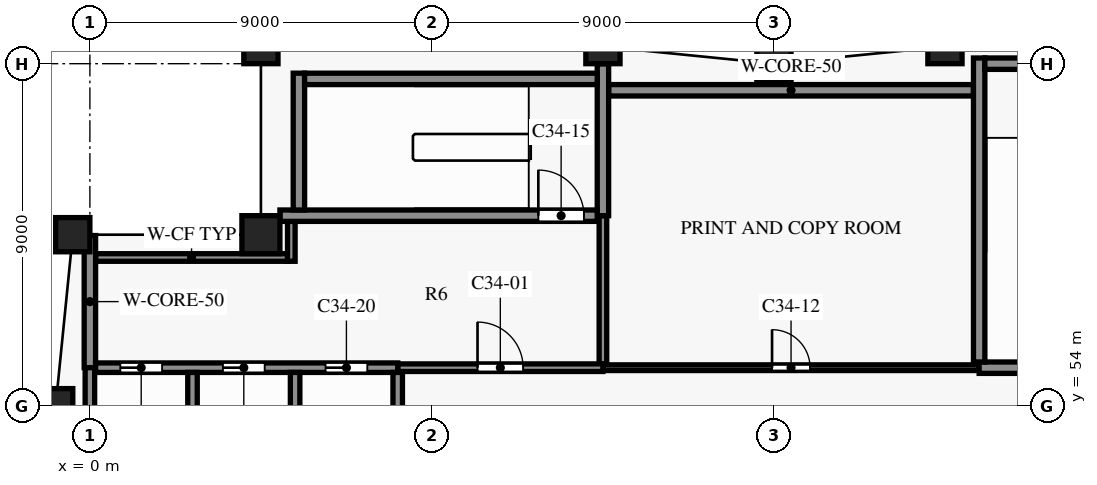
"""IFC4 building model, lengths in metres.
Left out: names, types, materials, properties, quantities, classifications, styles, units other than length and angle.
Written with IfcOpenShell. Run it as: python <this file> out.ifc"""

import sys

from ifc_helpers import new_model, si_unit, direction, frame, frame_2d, origin, origin_2d, place, context, subcontext, project, spatial, rectangle, extrude, element, fill, save


model = new_model("IFC4")
c1 = context("Model", 3, precision=1e-05, world=origin(), true_north=direction((0.0, 1.0)))
c2 = subcontext(c1, "Body", "Model", "MODEL_VIEW")
j1 = project(units=[si_unit("LENGTHUNIT", "METRE"), si_unit("PLANEANGLEUNIT", "RADIAN")], contexts=[c1])
p1 = place(None, origin())
s1 = spatial("IfcSite", under=j1, at=p1, CompositionType="ELEMENT")
p2 = place(p1, origin())
s2 = spatial("IfcBuilding", under=s1, at=p2, CompositionType="ELEMENT")
p3 = place(p2, frame((0.0, 0.0, 252.4)))
s3 = spatial("IfcBuildingStorey", under=s2, at=p3, CompositionType="ELEMENT", Elevation=252.4)
for number, where, z_axis, x_axis in (
    (1, (22.5, 63.45, 0.0), (0.0, 0.0, 1.0), (-0.995, -0.1, 0.0)),
    (2, (18.0, 63.0, 0.0), (0.0, 0.0, 1.0), (-1.0, 0.0, 0.0)),
    (3, (13.5, 63.45, 0.0), (0.0, 0.0, 1.0), (-0.995, 0.1, 0.0)),
    (4, (4.5, 63.45, 0.0), (0.0, 0.0, 1.0), (-0.995, -0.1, 0.0)),
    (5, (-0.45, 58.5, 0.0), (0.0, 0.0, 1.0), (-0.1, -0.995, 0.0)),
    (6, (-0.9, 54.0, 0.0), (0.0, 0.0, 1.0), (0.0, -1.0, 0.0)),
):
    element("IfcColumn", number, at=place(p3, frame(where, z_axis=z_axis, x_axis=x_axis)), inside=s3, PredefinedType="COLUMN", context=c2, shape_type="SweptSolid", body=[
        extrude(rectangle(XDim=0.9, YDim=0.9, at=origin_2d()), origin(), (0.0, 0.0, 1.0), 3.8),
    ])
p4 = place(p3, frame((4.5, 58.5, 0.0), z_axis=(0.0, 0.0, 1.0), x_axis=(1.0, 0.0, 0.0)))
e7 = element("IfcColumn", 7, at=p4, inside=s3, PredefinedType="COLUMN", context=c2, shape_type="SweptSolid", body=[
    extrude(rectangle(XDim=1.0, YDim=1.0, at=origin_2d()), origin(), (0.0, 0.0, 1.0), 3.8),
])
p5 = place(p3, frame((8.1, 55.0, 0.0), z_axis=(0.0, 0.0, 1.0), x_axis=(1.0, 0.0, 0.0)))
e8 = element("IfcWall", 8, at=p5, inside=s3, PredefinedType="PARTITIONING", context=c2, shape_type="SweptSolid", body=[
    extrude(rectangle(XDim=5.4, YDim=0.2, at=frame_2d((2.7, 0.0))), origin(), (0.0, 0.0, 1.0), 3.5),
])
p6 = place(p5, frame((2.1, 0.0, 0.0)))
e9 = element("IfcOpeningElement", 9, at=p6, cuts=e8, PredefinedType="OPENING", context=c2, shape_type="SweptSolid", body=[
    extrude(rectangle(XDim=1.2, YDim=2.2, at=frame_2d((0.6, 1.1))), frame((0.0, 0.11, 0.0), z_axis=(0.0, -1.0, 0.0), x_axis=(1.0, 0.0, 0.0)), (0.0, 0.0, 1.0), 0.22),
])
p7 = place(p3, frame((13.5, 55.0, 0.0), z_axis=(0.0, 0.0, 1.0), x_axis=(1.0, 0.0, 0.0)))
e10 = element("IfcWall", 10, at=p7, inside=s3, PredefinedType="PARTITIONING", context=c2, shape_type="SweptSolid", body=[
    extrude(rectangle(XDim=9.9, YDim=0.15, at=frame_2d((4.95, 0.0))), origin(), (0.0, 0.0, 1.0), 3.5),
])
p8 = place(p7, frame((4.45, 0.0, 0.0)))
e11 = element("IfcOpeningElement", 11, at=p8, cuts=e10, PredefinedType="OPENING", context=c2, shape_type="SweptSolid", body=[
    extrude(rectangle(XDim=1.0, YDim=2.1, at=frame_2d((0.5, 1.05))), frame((0.0, 0.085, 0.0), z_axis=(0.0, -1.0, 0.0), x_axis=(1.0, 0.0, 0.0)), (0.0, 0.0, 1.0), 0.17),
])
p9 = place(p3, frame((0.15, 55.0, 0.0), z_axis=(0.0, 0.0, 1.0), x_axis=(1.0, 0.0, 0.0)))
e12 = element("IfcWall", 12, at=p9, inside=s3, PredefinedType="SHEAR", context=c2, shape_type="SweptSolid", body=[
    extrude(rectangle(XDim=7.95, YDim=0.25, at=frame_2d((3.975, 0.0))), origin(), (0.0, 0.0, 1.0), 3.5),
])
p10 = place(p9, frame((0.65, 0.0, 0.0)))
e13 = element("IfcOpeningElement", 13, at=p10, cuts=e12, PredefinedType="OPENING", context=c2, shape_type="SweptSolid", body=[
    extrude(rectangle(XDim=1.1, YDim=2.1, at=frame_2d((0.55, 1.05))), frame((0.0, 0.135, 0.0), z_axis=(0.0, -1.0, 0.0), x_axis=(1.0, 0.0, 0.0)), (0.0, 0.0, 1.0), 0.27),
])
p11 = place(p9, frame((3.35, 0.0, 0.0)))
e14 = element("IfcOpeningElement", 14, at=p11, cuts=e12, PredefinedType="OPENING", context=c2, shape_type="SweptSolid", body=[
    extrude(rectangle(XDim=1.1, YDim=2.1, at=frame_2d((0.55, 1.05))), frame((0.0, 0.135, 0.0), z_axis=(0.0, -1.0, 0.0), x_axis=(1.0, 0.0, 0.0)), (0.0, 0.0, 1.0), 0.27),
])
p12 = place(p9, frame((6.05, 0.0, 0.0)))
e15 = element("IfcOpeningElement", 15, at=p12, cuts=e12, PredefinedType="OPENING", context=c2, shape_type="SweptSolid", body=[
    extrude(rectangle(XDim=1.1, YDim=2.1, at=frame_2d((0.55, 1.05))), frame((0.0, 0.135, 0.0), z_axis=(0.0, -1.0, 0.0), x_axis=(1.0, 0.0, 0.0)), (0.0, 0.0, 1.0), 0.27),
])
p13 = place(p3, frame((23.4, 55.0, 0.0), z_axis=(0.0, 0.0, 1.0), x_axis=(1.0, 0.0, 0.0)))
e16 = element("IfcWall", 16, at=p13, inside=s3, PredefinedType="SHEAR", context=c2, shape_type="SweptSolid", body=[
    extrude(rectangle(XDim=3.45, YDim=0.3, at=frame_2d((1.725, 0.0))), origin(), (0.0, 0.0, 1.0), 3.5),
])
p14 = place(p3, frame((0.15, 57.9, 0.0), z_axis=(0.0, 0.0, 1.0), x_axis=(1.0, 0.0, 0.0)))
e17 = element("IfcWall", 17, at=p14, inside=s3, PredefinedType="PARTITIONING", context=c2, shape_type="SweptSolid", body=[
    extrude(rectangle(XDim=5.05, YDim=0.2, at=frame_2d((2.525, 0.0))), origin(), (0.0, 0.0, 1.0), 3.5),
])
p15 = place(p3, frame((5.0, 59.0, 0.0), z_axis=(0.0, 0.0, 1.0), x_axis=(1.0, 0.0, 0.0)))
e18 = element("IfcWall", 18, at=p15, inside=s3, PredefinedType="SHEAR", context=c2, shape_type="SweptSolid", body=[
    extrude(rectangle(XDim=8.35, YDim=0.3, at=frame_2d((4.175, 0.0))), origin(), (0.0, 0.0, 1.0), 3.5),
])
p16 = place(p15, frame((6.8, 0.0, 0.0)))
e19 = element("IfcOpeningElement", 19, at=p16, cuts=e18, PredefinedType="OPENING", context=c2, shape_type="SweptSolid", body=[
    extrude(rectangle(XDim=1.2, YDim=2.2, at=frame_2d((0.6, 1.1))), frame((0.0, 0.16, 0.0), z_axis=(0.0, -1.0, 0.0), x_axis=(1.0, 0.0, 0.0)), (0.0, 0.0, 1.0), 0.32),
])
p17 = place(p3, frame((13.65, 62.3, 0.0), z_axis=(0.0, 0.0, 1.0), x_axis=(1.0, 0.0, 0.0)))
e20 = element("IfcWall", 20, at=p17, inside=s3, PredefinedType="SHEAR", context=c2, shape_type="SweptSolid", body=[
    extrude(rectangle(XDim=9.6, YDim=0.3, at=frame_2d((4.8, 0.0))), origin(), (0.0, 0.0, 1.0), 3.5),
])
p18 = place(p3, frame((5.65, 62.6, 0.0), z_axis=(0.0, 0.0, 1.0), x_axis=(1.0, 0.0, 0.0)))
e21 = element("IfcWall", 21, at=p18, inside=s3, PredefinedType="SHEAR", context=c2, shape_type="SweptSolid", body=[
    extrude(rectangle(XDim=7.7, YDim=0.3, at=frame_2d((3.85, 0.0))), origin(), (0.0, 0.0, 1.0), 3.5),
])
p19 = place(p3, frame((23.55, 63.0, 0.0), z_axis=(0.0, 0.0, 1.0), x_axis=(1.0, 0.0, 0.0)))
e22 = element("IfcWall", 22, at=p19, inside=s3, PredefinedType="SHEAR", context=c2, shape_type="SweptSolid", body=[
    extrude(rectangle(XDim=3.3, YDim=0.3, at=frame_2d((1.65, 0.0))), origin(), (0.0, 0.0, 1.0), 3.5),
])
p20 = place(p3, frame((0.0, 55.0, 0.0), z_axis=(0.0, 0.0, 1.0), x_axis=(0.0, 1.0, 0.0)))
e23 = element("IfcWall", 23, at=p20, inside=s3, PredefinedType="SHEAR", context=c2, shape_type="SweptSolid", body=[
    extrude(rectangle(XDim=3.478, YDim=0.3, at=frame_2d((1.739, 0.0))), origin(), (0.0, 0.0, 1.0), 3.5),
])
p21 = place(p3, frame((0.0, 51.65, 0.0), z_axis=(0.0, 0.0, 1.0), x_axis=(0.0, 1.0, 0.0)))
e24 = element("IfcWall", 24, at=p21, inside=s3, PredefinedType="SHEAR", context=c2, shape_type="SweptSolid", body=[
    extrude(rectangle(XDim=3.35, YDim=0.25, at=frame_2d((1.675, 0.0))), origin(), (0.0, 0.0, 1.0), 3.5),
])
p22 = place(p3, frame((2.7, 51.925, 0.0), z_axis=(0.0, 0.0, 1.0), x_axis=(0.0, 1.0, 0.0)))
e25 = element("IfcWall", 25, at=p22, inside=s3, PredefinedType="SHEAR", context=c2, shape_type="SweptSolid", body=[
    extrude(rectangle(XDim=2.95, YDim=0.25, at=frame_2d((1.475, 0.0))), origin(), (0.0, 0.0, 1.0), 3.5),
])
p23 = place(p3, frame((5.3, 57.8, 0.0), z_axis=(0.0, 0.0, 1.0), x_axis=(0.0, 1.0, 0.0)))
e26 = element("IfcWall", 26, at=p23, inside=s3, PredefinedType="PARTITIONING", context=c2, shape_type="SweptSolid", body=[
    extrude(rectangle(XDim=1.05, YDim=0.2, at=frame_2d((0.525, 0.0))), origin(), (0.0, 0.0, 1.0), 3.5),
])
p24 = place(p3, frame((5.4, 51.925, 0.0), z_axis=(0.0, 0.0, 1.0), x_axis=(0.0, 1.0, 0.0)))
e27 = element("IfcWall", 27, at=p24, inside=s3, PredefinedType="SHEAR", context=c2, shape_type="SweptSolid", body=[
    extrude(rectangle(XDim=2.95, YDim=0.25, at=frame_2d((1.475, 0.0))), origin(), (0.0, 0.0, 1.0), 3.5),
])
p25 = place(p3, frame((5.5, 59.15, 0.0), z_axis=(0.0, 0.0, 1.0), x_axis=(0.0, 1.0, 0.0)))
e28 = element("IfcWall", 28, at=p25, inside=s3, PredefinedType="SHEAR", context=c2, shape_type="SweptSolid", body=[
    extrude(rectangle(XDim=3.6, YDim=0.3, at=frame_2d((1.8, 0.0))), origin(), (0.0, 0.0, 1.0), 3.5),
])
p26 = place(p3, frame((8.1, 51.925, 0.0), z_axis=(0.0, 0.0, 1.0), x_axis=(0.0, 1.0, 0.0)))
e29 = element("IfcWall", 29, at=p26, inside=s3, PredefinedType="SHEAR", context=c2, shape_type="SweptSolid", body=[
    extrude(rectangle(XDim=2.95, YDim=0.25, at=frame_2d((1.475, 0.0))), origin(), (0.0, 0.0, 1.0), 3.5),
])
p27 = place(p3, frame((13.5, 55.1, 0.0), z_axis=(0.0, 0.0, 1.0), x_axis=(0.0, 1.0, 0.0)))
e30 = element("IfcWall", 30, at=p27, inside=s3, PredefinedType="PARTITIONING", context=c2, shape_type="SweptSolid", body=[
    extrude(rectangle(XDim=3.9, YDim=0.2, at=frame_2d((1.95, 0.0))), origin(), (0.0, 0.0, 1.0), 3.5),
])
p28 = place(p3, frame((13.5, 59.0, 0.0), z_axis=(0.0, 0.0, 1.0), x_axis=(0.0, 1.0, 0.0)))
e31 = element("IfcWall", 31, at=p28, inside=s3, PredefinedType="SHEAR", context=c2, shape_type="SweptSolid", body=[
    extrude(rectangle(XDim=3.998, YDim=0.3, at=frame_2d((1.999, 0.0))), origin(), (0.0, 0.0, 1.0), 3.5),
])
p29 = place(p3, frame((23.4, 55.15, 0.0), z_axis=(0.0, 0.0, 1.0), x_axis=(0.0, 1.0, 0.0)))
e32 = element("IfcWall", 32, at=p29, inside=s3, PredefinedType="SHEAR", context=c2, shape_type="SweptSolid", body=[
    extrude(rectangle(XDim=8.0, YDim=0.3, at=frame_2d((4.0, 0.0))), origin(), (0.0, 0.0, 1.0), 3.5),
])
p30 = place(p6, origin())
e33 = element("IfcDoor", 33, at=p30, inside=s3, OperationType="SINGLE_SWING_RIGHT", PredefinedType="DOOR", context=c2, shape_type="SweptSolid", body=[
    extrude(rectangle(XDim=1.2, YDim=2.2, at=frame_2d((0.6, 1.1))), frame((0.0, 0.025, 0.0), z_axis=(0.0, -1.0, 0.0), x_axis=(1.0, 0.0, 0.0)), (0.0, 0.0, 1.0), 0.05),
])
fill(e9, e33)
p31 = place(p8, origin())
e34 = element("IfcDoor", 34, at=p31, inside=s3, OperationType="SINGLE_SWING_LEFT", PredefinedType="DOOR", context=c2, shape_type="SweptSolid", body=[
    extrude(rectangle(XDim=1.0, YDim=2.1, at=frame_2d((0.5, 1.05))), frame((0.0, 0.025, 0.0), z_axis=(0.0, -1.0, 0.0), x_axis=(1.0, 0.0, 0.0)), (0.0, 0.0, 1.0), 0.05),
])
fill(e11, e34)
p32 = place(p16, origin())
e35 = element("IfcDoor", 35, at=p32, inside=s3, OperationType="SINGLE_SWING_RIGHT", PredefinedType="DOOR", context=c2, shape_type="SweptSolid", body=[
    extrude(rectangle(XDim=1.2, YDim=2.2, at=frame_2d((0.6, 1.1))), frame((0.0, 0.025, 0.0), z_axis=(0.0, -1.0, 0.0), x_axis=(1.0, 0.0, 0.0)), (0.0, 0.0, 1.0), 0.05),
])
fill(e19, e35)
p33 = place(p10, origin())
e36 = element("IfcDoor", 36, at=p33, inside=s3, OperationType="DOUBLE_DOOR_SLIDING", PredefinedType="DOOR", context=c2, shape_type="SweptSolid", body=[
    extrude(rectangle(XDim=1.1, YDim=2.1, at=frame_2d((0.55, 1.05))), frame((0.0, 0.025, 0.0), z_axis=(0.0, -1.0, 0.0), x_axis=(1.0, 0.0, 0.0)), (0.0, 0.0, 1.0), 0.05),
])
fill(e13, e36)
p34 = place(p11, origin())
e37 = element("IfcDoor", 37, at=p34, inside=s3, OperationType="DOUBLE_DOOR_SLIDING", PredefinedType="DOOR", context=c2, shape_type="SweptSolid", body=[
    extrude(rectangle(XDim=1.1, YDim=2.1, at=frame_2d((0.55, 1.05))), frame((0.0, 0.025, 0.0), z_axis=(0.0, -1.0, 0.0), x_axis=(1.0, 0.0, 0.0)), (0.0, 0.0, 1.0), 0.05),
])
fill(e14, e37)
p35 = place(p12, origin())
e38 = element("IfcDoor", 38, at=p35, inside=s3, OperationType="DOUBLE_DOOR_SLIDING", PredefinedType="DOOR", context=c2, shape_type="SweptSolid", body=[
    extrude(rectangle(XDim=1.1, YDim=2.1, at=frame_2d((0.55, 1.05))), frame((0.0, 0.025, 0.0), z_axis=(0.0, -1.0, 0.0), x_axis=(1.0, 0.0, 0.0)), (0.0, 0.0, 1.0), 0.05),
])
fill(e15, e38)
save(model, sys.argv[1])
